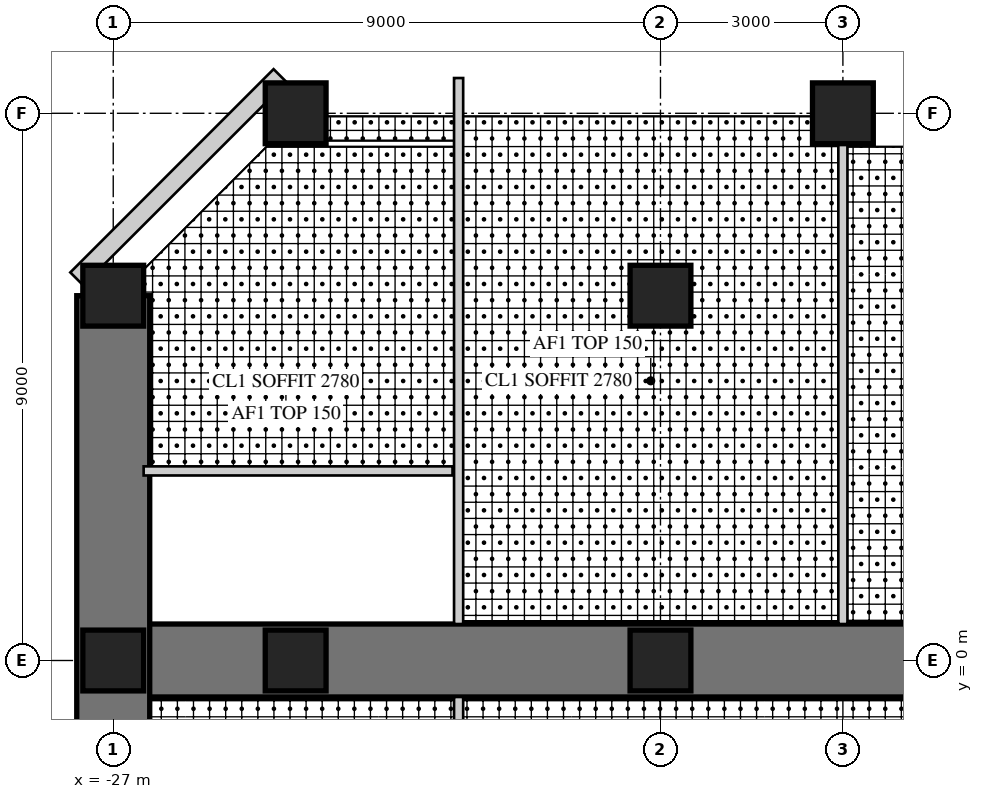
"""IFC4 building model, lengths in metres.
Left out: names, types, materials, properties, quantities, classifications, styles, units other than length and angle.
Written with IfcOpenShell. Run it as: python <this file> out.ifc"""

import sys

from ifc_helpers import new_model, si_unit, direction, frame, frame_2d, origin, origin_2d, place, context, subcontext, project, spatial, rectangle, hollow_rectangle, extrude, element, fill, save


model = new_model("IFC4")
c1 = context("Model", 3, precision=1e-05, world=origin(), true_north=direction((0.0, 1.0)))
c2 = subcontext(c1, "Body", "Model", "MODEL_VIEW")
j1 = project(units=[si_unit("LENGTHUNIT", "METRE"), si_unit("PLANEANGLEUNIT", "RADIAN")], contexts=[c1])
p1 = place(None, origin())
s1 = spatial("IfcSite", under=j1, at=p1, CompositionType="ELEMENT")
p2 = place(p1, origin())
s2 = spatial("IfcBuilding", under=s1, at=p2, CompositionType="ELEMENT")
p3 = place(p2, frame((0.0, 0.0, 152.5)))
s3 = spatial("IfcBuildingStorey", under=s2, at=p3, CompositionType="ELEMENT", Elevation=152.5)
p4 = place(p3, frame((-9.0, 0.0, 0.0), z_axis=(0.0, 0.0, 1.0), x_axis=(-1.0, 0.0, 0.0)))
e1 = element("IfcWall", 1, at=p4, inside=s3, PredefinedType="SHEAR", context=c2, shape_type="SweptSolid", body=[
    extrude(rectangle(XDim=18.0, YDim=1.2, at=frame_2d((9.0, 0.0))), origin(), (0.0, 0.0, 1.0), 4.0),
])
p5 = place(p4, frame((9.8, 0.0, 0.0)))
e2 = element("IfcOpeningElement", 2, at=p5, cuts=e1, PredefinedType="OPENING", context=c2, shape_type="SweptSolid", body=[
    extrude(rectangle(XDim=1.0, YDim=2.2, at=frame_2d((0.5, 1.1))), frame((0.0, 0.61, 0.0), z_axis=(0.0, -1.0, 0.0), x_axis=(1.0, 0.0, 0.0)), (0.0, 0.0, 1.0), 1.22),
])
p6 = place(p3, frame((-27.0, 6.0, 0.0), z_axis=(0.0, 0.0, 1.0), x_axis=(0.0, -1.0, 0.0)))
e3 = element("IfcWall", 3, at=p6, inside=s3, PredefinedType="SHEAR", context=c2, shape_type="SweptSolid", body=[
    extrude(rectangle(XDim=12.0, YDim=1.2, at=frame_2d((6.0, 0.0))), origin(), (0.0, 0.0, 1.0), 4.0),
])
p7 = place(p6, frame((1.55, 0.0, 0.6)))
e4 = element("IfcOpeningElement", 4, at=p7, cuts=e3, PredefinedType="OPENING", context=c2, shape_type="SweptSolid", body=[
    extrude(rectangle(XDim=3.0, YDim=2.4, at=frame_2d((1.5, 1.2))), frame((0.0, 0.61, 0.0), z_axis=(0.0, -1.0, 0.0), x_axis=(1.0, 0.0, 0.0)), (0.0, 0.0, 1.0), 1.22),
])
p8 = place(p6, frame((7.45, 0.0, 0.6)))
e5 = element("IfcOpeningElement", 5, at=p8, cuts=e3, PredefinedType="OPENING", context=c2, shape_type="SweptSolid", body=[
    extrude(rectangle(XDim=3.0, YDim=2.4, at=frame_2d((1.5, 1.2))), frame((0.0, 0.61, 0.0), z_axis=(0.0, -1.0, 0.0), x_axis=(1.0, 0.0, 0.0)), (0.0, 0.0, 1.0), 1.22),
])
for number, where, z_axis, x_axis in (
    (6, (-15.0, 9.0, 0.0), (0.0, 0.0, 1.0), (1.0, 0.0, 0.0)),
    (7, (-24.0, 9.0, 0.0), (0.0, 0.0, 1.0), (1.0, 0.0, 0.0)),
    (8, (-27.0, 6.0, 0.0), (0.0, 0.0, 1.0), (1.0, 0.0, 0.0)),
    (9, (-27.0, 0.0, 0.0), (0.0, 0.0, 1.0), (1.0, 0.0, 0.0)),
    (10, (-18.0, 6.0, 0.0), (0.0, 0.0, 1.0), (1.0, 0.0, 0.0)),
    (11, (-18.0, 0.0, 0.0), (0.0, 0.0, 1.0), (1.0, 0.0, 0.0)),
    (12, (-24.0, 0.0, 0.0), (0.0, 0.0, 1.0), (1.0, 0.0, 0.0)),
):
    element("IfcColumn", number, at=place(p3, frame(where, z_axis=z_axis, x_axis=x_axis)), inside=s3, PredefinedType="COLUMN", context=c2, shape_type="SweptSolid", body=[
        extrude(rectangle(XDim=1.0, YDim=1.0, at=origin_2d()), origin(), (0.0, 0.0, 1.0), 4.0),
    ])
p9 = place(p3, frame((-24.257, 9.62, 0.0), z_axis=(0.0, 0.0, 1.0), x_axis=(-0.707106781187, -0.707106781187, 0.0)))
e13 = element("IfcWall", 13, at=p9, inside=s3, PredefinedType="SOLIDWALL", context=c2, shape_type="SweptSolid", body=[
    extrude(rectangle(XDim=4.728, YDim=0.3, at=frame_2d((2.364, 0.0))), origin(), (0.0, 0.0, 1.0), 3.8),
])
p10 = place(p9, frame((1.914, 0.0, 0.3)))
e14 = element("IfcOpeningElement", 14, at=p10, cuts=e13, PredefinedType="OPENING", context=c2, shape_type="SweptSolid", body=[
    extrude(rectangle(XDim=0.9, YDim=2.4, at=frame_2d((0.45, 1.2))), frame((0.0, 0.16, 0.0), z_axis=(0.0, -1.0, 0.0), x_axis=(1.0, 0.0, 0.0)), (0.0, 0.0, 1.0), 0.32),
])
p11 = place(p3, frame((-15.0, 8.5, 0.0), z_axis=(0.0, 0.0, 1.0), x_axis=(0.0, -1.0, 0.0)))
e15 = element("IfcWall", 15, at=p11, inside=s3, PredefinedType="PARTITIONING", context=c2, shape_type="SweptSolid", body=[
    extrude(rectangle(XDim=7.9, YDim=0.15, at=frame_2d((3.95, 0.0))), origin(), (0.0, 0.0, 1.0), 3.0),
])
p12 = place(p11, frame((3.45, 0.0, 0.0)))
e16 = element("IfcOpeningElement", 16, at=p12, cuts=e15, PredefinedType="OPENING", context=c2, shape_type="SweptSolid", body=[
    extrude(rectangle(XDim=1.0, YDim=2.1, at=frame_2d((0.5, 1.05))), frame((0.0, 0.085, 0.0), z_axis=(0.0, -1.0, 0.0), x_axis=(1.0, 0.0, 0.0)), (0.0, 0.0, 1.0), 0.17),
])
p13 = place(p3, frame((-21.32, -0.6, 0.0), z_axis=(0.0, 0.0, 1.0), x_axis=(0.0, -1.0, 0.0)))
e17 = element("IfcWall", 17, at=p13, inside=s3, PredefinedType="PARTITIONING", context=c2, shape_type="SweptSolid", body=[
    extrude(rectangle(XDim=8.98, YDim=0.15, at=frame_2d((4.49, 0.0))), origin(), (0.0, 0.0, 1.0), 3.8),
])
p14 = place(p13, frame((0.45, 0.0, 0.0)))
e18 = element("IfcOpeningElement", 18, at=p14, cuts=e17, PredefinedType="OPENING", context=c2, shape_type="SweptSolid", body=[
    extrude(rectangle(XDim=1.0, YDim=2.2, at=frame_2d((0.5, 1.1))), frame((0.0, 0.085, 0.0), z_axis=(0.0, -1.0, 0.0), x_axis=(1.0, 0.0, 0.0)), (0.0, 0.0, 1.0), 0.17),
])
p15 = place(p3, frame((-21.42, 3.118, 0.0), z_axis=(0.0, 0.0, 1.0), x_axis=(-1.0, 0.0, 0.0)))
e19 = element("IfcWall", 19, at=p15, inside=s3, PredefinedType="PARTITIONING", context=c2, shape_type="SweptSolid", body=[
    extrude(rectangle(XDim=5.08, YDim=0.15, at=frame_2d((2.54, 0.0))), origin(), (0.0, 0.0, 1.0), 3.8),
])
p16 = place(p3, frame((-21.32, 9.58, 0.0), z_axis=(0.0, 0.0, 1.0), x_axis=(0.0, -1.0, 0.0)))
e20 = element("IfcWall", 20, at=p16, inside=s3, PredefinedType="PARTITIONING", context=c2, shape_type="SweptSolid", body=[
    extrude(rectangle(XDim=8.98, YDim=0.15, at=frame_2d((4.49, 0.0))), origin(), (0.0, 0.0, 1.0), 3.8),
])
p17 = place(p16, frame((4.987, 0.0, 0.0)))
e21 = element("IfcOpeningElement", 21, at=p17, cuts=e20, PredefinedType="OPENING", context=c2, shape_type="SweptSolid", body=[
    extrude(rectangle(XDim=1.0, YDim=2.2, at=frame_2d((0.5, 1.1))), frame((0.0, 0.085, 0.0), z_axis=(0.0, -1.0, 0.0), x_axis=(1.0, 0.0, 0.0)), (0.0, 0.0, 1.0), 0.17),
])
p18 = place(p16, frame((7.63, 0.0, 0.0)))
e22 = element("IfcOpeningElement", 22, at=p18, cuts=e20, PredefinedType="OPENING", context=c2, shape_type="SweptSolid", body=[
    extrude(rectangle(XDim=1.0, YDim=2.2, at=frame_2d((0.5, 1.1))), frame((0.0, 0.085, 0.0), z_axis=(0.0, -1.0, 0.0), x_axis=(1.0, 0.0, 0.0)), (0.0, 0.0, 1.0), 0.17),
])
p19 = place(p10, origin())
e23 = element("IfcWindow", 23, at=p19, inside=s3, PartitioningType="SINGLE_PANEL", PredefinedType="WINDOW", context=c2, shape_type="SweptSolid", body=[
    extrude(hollow_rectangle(XDim=0.9, YDim=2.4, WallThickness=0.06, at=frame_2d((0.45, 1.2))), frame((0.0, 0.03, 0.0), z_axis=(0.0, -1.0, 0.0), x_axis=(1.0, 0.0, 0.0)), (0.0, 0.0, 1.0), 0.06),
    extrude(rectangle(XDim=0.779, YDim=2.279, at=frame_2d((0.45, 1.2))), frame((0.0, 0.03, 0.0), z_axis=(0.0, -1.0, 0.0), x_axis=(1.0, 0.0, 0.0)), (0.0, 0.0, 1.0), 0.06),
])
fill(e14, e23)
p20 = place(p7, origin())
e24 = element("IfcWindow", 24, at=p20, inside=s3, PartitioningType="SINGLE_PANEL", PredefinedType="WINDOW", context=c2, shape_type="SweptSolid", body=[
    extrude(hollow_rectangle(XDim=3.0, YDim=2.4, WallThickness=0.06, at=frame_2d((1.5, 1.2))), frame((0.0, 0.03, 0.0), z_axis=(0.0, -1.0, 0.0), x_axis=(1.0, 0.0, 0.0)), (0.0, 0.0, 1.0), 0.06),
    extrude(rectangle(XDim=2.879, YDim=2.279, at=frame_2d((1.5, 1.2))), frame((0.0, 0.03, 0.0), z_axis=(0.0, -1.0, 0.0), x_axis=(1.0, 0.0, 0.0)), (0.0, 0.0, 1.0), 0.06),
])
fill(e4, e24)
p21 = place(p12, origin())
e25 = element("IfcDoor", 25, at=p21, inside=s3, OperationType="SINGLE_SWING_RIGHT", PredefinedType="DOOR", context=c2, shape_type="SweptSolid", body=[
    extrude(rectangle(XDim=1.0, YDim=2.1, at=frame_2d((0.5, 1.05))), frame((0.0, 0.025, 0.0), z_axis=(0.0, -1.0, 0.0), x_axis=(1.0, 0.0, 0.0)), (0.0, 0.0, 1.0), 0.05),
])
fill(e16, e25)
p22 = place(p17, frame((1.0, 0.0, 0.0), z_axis=(0.0, 0.0, 1.0), x_axis=(-1.0, 0.0, 0.0)))
e26 = element("IfcDoor", 26, at=p22, inside=s3, OperationType="SINGLE_SWING_LEFT", PredefinedType="DOOR", context=c2, shape_type="SweptSolid", body=[
    extrude(rectangle(XDim=1.0, YDim=2.2, at=frame_2d((0.5, 1.1))), frame((0.0, 0.025, 0.0), z_axis=(0.0, -1.0, 0.0), x_axis=(1.0, 0.0, 0.0)), (0.0, 0.0, 1.0), 0.05),
])
fill(e21, e26)
p23 = place(p18, frame((1.0, 0.0, 0.0), z_axis=(0.0, 0.0, 1.0), x_axis=(-1.0, 0.0, 0.0)))
e27 = element("IfcDoor", 27, at=p23, inside=s3, OperationType="SINGLE_SWING_LEFT", PredefinedType="DOOR", context=c2, shape_type="SweptSolid", body=[
    extrude(rectangle(XDim=1.0, YDim=2.2, at=frame_2d((0.5, 1.1))), frame((0.0, 0.025, 0.0), z_axis=(0.0, -1.0, 0.0), x_axis=(1.0, 0.0, 0.0)), (0.0, 0.0, 1.0), 0.05),
])
fill(e22, e27)
p24 = place(p5, frame((1.0, 0.0, 0.0), z_axis=(0.0, 0.0, 1.0), x_axis=(-1.0, 0.0, 0.0)))
e28 = element("IfcDoor", 28, at=p24, inside=s3, OperationType="SINGLE_SWING_LEFT", PredefinedType="DOOR", context=c2, shape_type="SweptSolid", body=[
    extrude(rectangle(XDim=1.0, YDim=2.2, at=frame_2d((0.5, 1.1))), frame((0.0, 0.025, 0.0), z_axis=(0.0, -1.0, 0.0), x_axis=(1.0, 0.0, 0.0)), (0.0, 0.0, 1.0), 0.05),
])
fill(e2, e28)
save(model, sys.argv[1])
